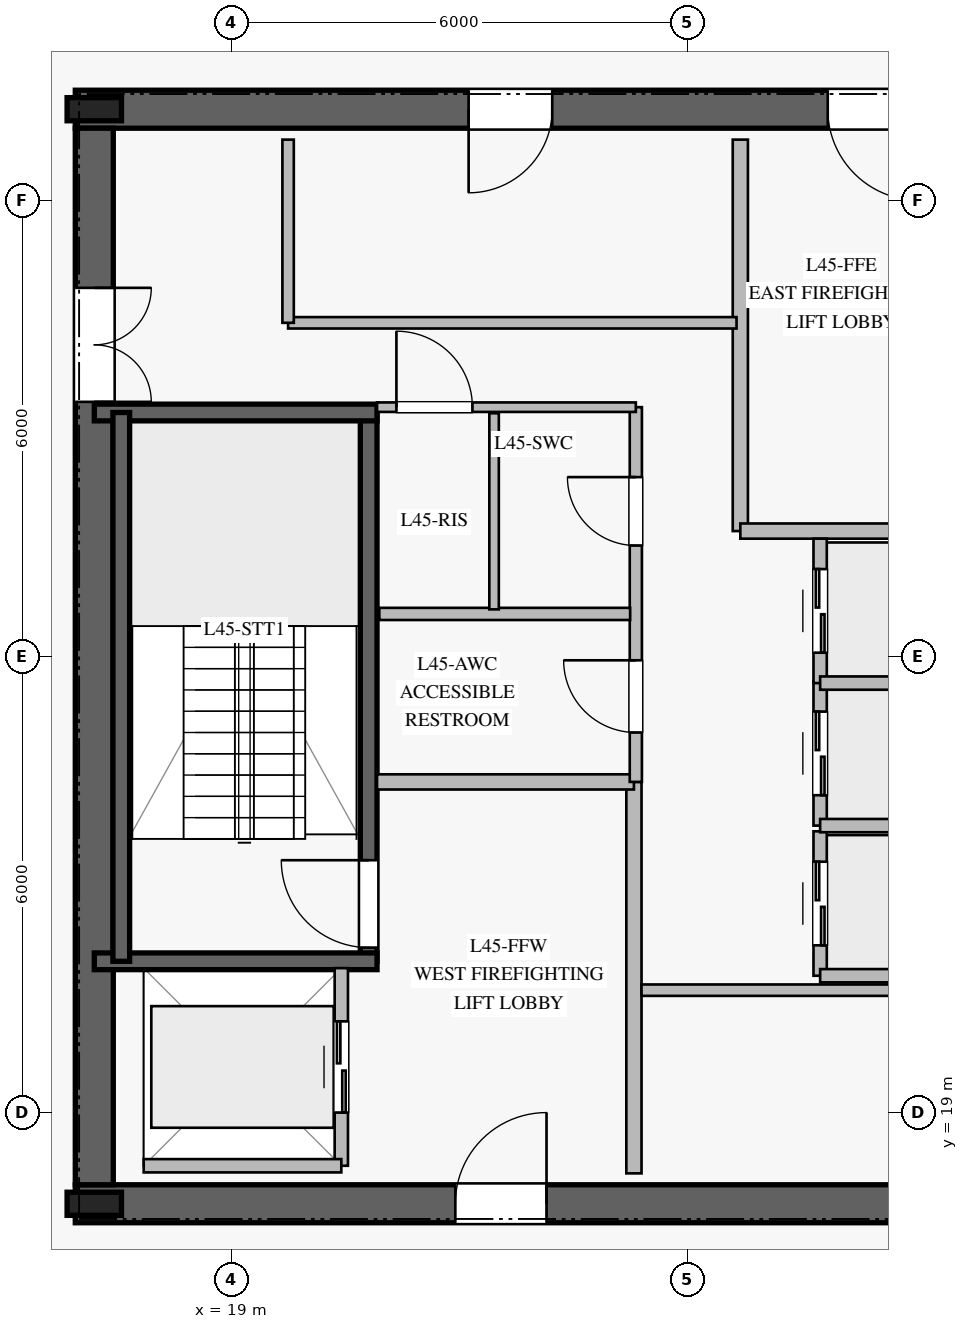
"""IFC4 building model, lengths in metres.
Left out: names, types, materials, properties, quantities, classifications, styles, units other than length and angle.
Written with IfcOpenShell. Run it as: python <this file> out.ifc"""

import sys

from ifc_helpers import new_model, si_unit, direction, frame, frame_2d, origin, origin_2d, place, context, subcontext, project, spatial, rectangle, i_section, extrude, element, fill, save


model = new_model("IFC4")
c1 = context("Model", 3, precision=1e-05, world=origin(), true_north=direction((0.0, 1.0)))
c2 = subcontext(c1, "Body", "Model", "MODEL_VIEW")
j1 = project(units=[si_unit("LENGTHUNIT", "METRE"), si_unit("PLANEANGLEUNIT", "RADIAN")], contexts=[c1])
p1 = place(None, origin())
s1 = spatial("IfcSite", under=j1, at=p1, CompositionType="ELEMENT")
p2 = place(p1, origin())
s2 = spatial("IfcBuilding", under=s1, at=p2, CompositionType="ELEMENT")
p3 = place(p2, frame((0.0, 0.0, 188.8)))
s3 = spatial("IfcBuildingStorey", under=s2, at=p3, CompositionType="ELEMENT", Elevation=188.8)
p4 = place(p3, frame((16.95, 17.8, 0.0), z_axis=(0.0, 0.0, 1.0), x_axis=(1.0, 0.0, 0.0)))
e1 = element("IfcWall", 1, at=p4, inside=s3, PredefinedType="SHEAR", context=c2, shape_type="SweptSolid", body=[
    extrude(rectangle(XDim=16.1, YDim=0.5, at=frame_2d((8.05, 0.0))), origin(), (0.0, 0.0, 1.0), 3.78),
])
p5 = place(p4, frame((5.0, 0.0, 0.0)))
e2 = element("IfcOpeningElement", 2, at=p5, cuts=e1, PredefinedType="OPENING", context=c2, shape_type="SweptSolid", body=[
    extrude(rectangle(XDim=1.2, YDim=2.25, at=frame_2d((0.6, 1.125))), frame((0.0, 0.26, 0.0), z_axis=(0.0, -1.0, 0.0), x_axis=(1.0, 0.0, 0.0)), (0.0, 0.0, 1.0), 0.52),
])
p6 = place(p4, frame((10.9, 0.0, 0.0)))
e3 = element("IfcOpeningElement", 3, at=p6, cuts=e1, PredefinedType="OPENING", context=c2, shape_type="SweptSolid", body=[
    extrude(rectangle(XDim=1.1, YDim=2.2, at=frame_2d((0.55, 1.1))), frame((0.0, 0.26, 0.0), z_axis=(0.0, -1.0, 0.0), x_axis=(1.0, 0.0, 0.0)), (0.0, 0.0, 1.0), 0.52),
])
p7 = place(p3, frame((33.05, 32.2, 0.0), z_axis=(0.0, 0.0, 1.0), x_axis=(-1.0, 0.0, 0.0)))
e4 = element("IfcWall", 4, at=p7, inside=s3, PredefinedType="SHEAR", context=c2, shape_type="SweptSolid", body=[
    extrude(rectangle(XDim=16.1, YDim=0.5, at=frame_2d((8.05, 0.0))), origin(), (0.0, 0.0, 1.0), 3.78),
])
p8 = place(p7, frame((5.0, 0.0, 0.0)))
e5 = element("IfcOpeningElement", 5, at=p8, cuts=e4, PredefinedType="OPENING", context=c2, shape_type="SweptSolid", body=[
    extrude(rectangle(XDim=1.2, YDim=2.25, at=frame_2d((0.6, 1.125))), frame((0.0, 0.26, 0.0), z_axis=(0.0, -1.0, 0.0), x_axis=(1.0, 0.0, 0.0)), (0.0, 0.0, 1.0), 0.52),
])
p9 = place(p7, frame((9.825, 0.0, 0.0)))
e6 = element("IfcOpeningElement", 6, at=p9, cuts=e4, PredefinedType="OPENING", context=c2, shape_type="SweptSolid", body=[
    extrude(rectangle(XDim=1.1, YDim=2.2, at=frame_2d((0.55, 1.1))), frame((0.0, 0.26, 0.0), z_axis=(0.0, -1.0, 0.0), x_axis=(1.0, 0.0, 0.0)), (0.0, 0.0, 1.0), 0.52),
])
p10 = place(p3, frame((17.2, 31.95, 0.0), z_axis=(0.0, 0.0, 1.0), x_axis=(0.0, -1.0, 0.0)))
e7 = element("IfcWall", 7, at=p10, inside=s3, PredefinedType="SHEAR", context=c2, shape_type="SweptSolid", body=[
    extrude(rectangle(XDim=13.9, YDim=0.5, at=frame_2d((6.95, 0.0))), origin(), (0.0, 0.0, 1.0), 3.78),
])
p11 = place(p10, frame((2.1, 0.0, 0.0)))
e8 = element("IfcOpeningElement", 8, at=p11, cuts=e7, PredefinedType="OPENING", context=c2, shape_type="SweptSolid", body=[
    extrude(rectangle(XDim=1.5, YDim=2.2, at=frame_2d((0.75, 1.1))), frame((0.0, 0.26, 0.0), z_axis=(0.0, -1.0, 0.0), x_axis=(1.0, 0.0, 0.0)), (0.0, 0.0, 1.0), 0.52),
])
for number, where, z_axis, x_axis in (
    (9, (17.2, 17.8, 0.0), (0.0, 0.0, 1.0), (1.0, 0.0, 0.0)),
    (10, (17.2, 32.2, 0.0), (0.0, 0.0, 1.0), (1.0, 0.0, 0.0)),
):
    element("IfcColumn", number, at=place(p3, frame(where, z_axis=z_axis, x_axis=x_axis)), inside=s3, PredefinedType="COLUMN", context=c2, shape_type="SweptSolid", body=[
        extrude(i_section(OverallWidth=0.304, OverallDepth=0.716, WebThickness=0.021, FlangeThickness=0.04, at=origin_2d()), origin(), (0.0, 0.0, 1.0), 4.0),
    ])
p12 = place(p3, frame((20.81, 20.99, 0.0), z_axis=(0.0, 0.0, 1.0), x_axis=(0.0, 1.0, 0.0)))
e11 = element("IfcWall", 11, at=p12, inside=s3, PredefinedType="SOLIDWALL", context=c2, shape_type="SweptSolid", body=[
    extrude(rectangle(XDim=7.22, YDim=0.22, at=frame_2d((3.61, 0.0))), origin(), (0.0, 0.0, 1.0), 3.78),
])
p13 = place(p12, frame((0.18, 0.0, 0.0)))
e12 = element("IfcOpeningElement", 12, at=p13, cuts=e11, PredefinedType="OPENING", context=c2, shape_type="SweptSolid", body=[
    extrude(rectangle(XDim=1.15, YDim=2.2, at=frame_2d((0.575, 1.1))), frame((0.0, 0.12, 0.0), z_axis=(0.0, -1.0, 0.0), x_axis=(1.0, 0.0, 0.0)), (0.0, 0.0, 1.0), 0.24),
])
for number, where, z_axis, x_axis in (
    (13, (17.2, 20.99, 0.0), (0.0, 0.0, 1.0), (1.0, 0.0, 0.0)),
    (14, (17.2, 28.21, 0.0), (0.0, 0.0, 1.0), (1.0, 0.0, 0.0)),
):
    element("IfcWall", number, at=place(p3, frame(where, z_axis=z_axis, x_axis=x_axis)), inside=s3, PredefinedType="SOLIDWALL", context=c2, shape_type="SweptSolid", body=[
        extrude(rectangle(XDim=3.72, YDim=0.22, at=frame_2d((1.86, 0.0))), origin(), (0.0, 0.0, 1.0), 3.78),
    ])
p14 = place(p3, frame((17.555, 28.21, 0.0), z_axis=(0.0, 0.0, 1.0), x_axis=(0.0, -1.0, 0.0)))
e15 = element("IfcWall", 15, at=p14, inside=s3, PredefinedType="SOLIDWALL", context=c2, shape_type="SweptSolid", body=[
    extrude(rectangle(XDim=7.22, YDim=0.22, at=frame_2d((3.61, 0.0))), origin(), (0.0, 0.0, 1.0), 3.78),
])
p15 = place(p3, frame((24.3, 18.2, 0.0), z_axis=(0.0, 0.0, 1.0), x_axis=(0.0, 1.0, 0.0)))
e16 = element("IfcWall", 16, at=p15, inside=s3, PredefinedType="PARTITIONING", context=c2, shape_type="SweptSolid", body=[
    extrude(rectangle(XDim=5.15, YDim=0.2, at=frame_2d((2.575, 0.0))), origin(), (0.0, 0.0, 1.0), 3.78),
])
p16 = place(p3, frame((20.92, 23.35, 0.0), z_axis=(0.0, 0.0, 1.0), x_axis=(1.0, 0.0, 0.0)))
e17 = element("IfcWall", 17, at=p16, inside=s3, PredefinedType="PARTITIONING", context=c2, shape_type="SweptSolid", body=[
    extrude(rectangle(XDim=3.38, YDim=0.2, at=frame_2d((1.69, 0.0))), origin(), (0.0, 0.0, 1.0), 3.78),
])
p17 = place(p3, frame((25.7, 26.65, 0.0), z_axis=(0.0, 0.0, 1.0), x_axis=(0.0, 1.0, 0.0)))
e18 = element("IfcWall", 18, at=p17, inside=s3, PredefinedType="PARTITIONING", context=c2, shape_type="SweptSolid", body=[
    extrude(rectangle(XDim=5.15, YDim=0.2, at=frame_2d((2.575, 0.0))), origin(), (0.0, 0.0, 1.0), 3.78),
])
p18 = place(p3, frame((25.7, 26.65, 0.0), z_axis=(0.0, 0.0, 1.0), x_axis=(1.0, 0.0, 0.0)))
e19 = element("IfcWall", 19, at=p18, inside=s3, PredefinedType="PARTITIONING", context=c2, shape_type="SweptSolid", body=[
    extrude(rectangle(XDim=3.38, YDim=0.2, at=frame_2d((1.69, 0.0))), origin(), (0.0, 0.0, 1.0), 3.78),
])
p19 = place(p3, frame((24.325, 23.35, 0.0), z_axis=(0.0, 0.0, 1.0), x_axis=(0.0, 1.0, 0.0)))
e20 = element("IfcWall", 20, at=p19, inside=s3, PredefinedType="PLUMBINGWALL", context=c2, shape_type="SweptSolid", body=[
    extrude(rectangle(XDim=4.93, YDim=0.16, at=frame_2d((2.465, 0.0))), origin(), (0.0, 0.0, 1.0), 3.78),
])
p20 = place(p19, frame((0.65, 0.0, 0.0)))
e21 = element("IfcOpeningElement", 21, at=p20, cuts=e20, PredefinedType="OPENING", context=c2, shape_type="SweptSolid", body=[
    extrude(rectangle(XDim=0.95, YDim=2.1, at=frame_2d((0.475, 1.05))), frame((0.0, 0.09, 0.0), z_axis=(0.0, -1.0, 0.0), x_axis=(1.0, 0.0, 0.0)), (0.0, 0.0, 1.0), 0.18),
])
p21 = place(p19, frame((3.11, 0.0, 0.0)))
e22 = element("IfcOpeningElement", 22, at=p21, cuts=e20, PredefinedType="OPENING", context=c2, shape_type="SweptSolid", body=[
    extrude(rectangle(XDim=0.9, YDim=2.1, at=frame_2d((0.45, 1.05))), frame((0.0, 0.09, 0.0), z_axis=(0.0, -1.0, 0.0), x_axis=(1.0, 0.0, 0.0)), (0.0, 0.0, 1.0), 0.18),
])
p22 = place(p3, frame((20.92, 28.28, 0.0), z_axis=(0.0, 0.0, 1.0), x_axis=(1.0, 0.0, 0.0)))
e23 = element("IfcWall", 23, at=p22, inside=s3, PredefinedType="PARTITIONING", context=c2, shape_type="SweptSolid", body=[
    extrude(rectangle(XDim=3.405, YDim=0.125, at=frame_2d((1.703, 0.0))), origin(), (0.0, 0.0, 1.0), 3.78),
])
p23 = place(p22, frame((0.255, 0.0, 0.0)))
e24 = element("IfcOpeningElement", 24, at=p23, cuts=e23, PredefinedType="OPENING", context=c2, shape_type="SweptSolid", body=[
    extrude(rectangle(XDim=1.0, YDim=2.15, at=frame_2d((0.5, 1.075))), frame((0.0, 0.073, 0.0), z_axis=(0.0, -1.0, 0.0), x_axis=(1.0, 0.0, 0.0)), (0.0, 0.0, 1.0), 0.145),
])
p24 = place(p3, frame((20.95, 25.56, 0.0), z_axis=(0.0, 0.0, 1.0), x_axis=(1.0, 0.0, 0.0)))
e25 = element("IfcWall", 25, at=p24, inside=s3, PredefinedType="PLUMBINGWALL", context=c2, shape_type="SweptSolid", body=[
    extrude(rectangle(XDim=3.3, YDim=0.16, at=frame_2d((1.65, 0.0))), origin(), (0.0, 0.0, 1.0), 3.78),
])
p25 = place(p3, frame((22.46, 25.62, 0.0), z_axis=(0.0, 0.0, 1.0), x_axis=(0.0, 1.0, 0.0)))
e26 = element("IfcWall", 26, at=p25, inside=s3, PredefinedType="PARTITIONING", context=c2, shape_type="SweptSolid", body=[
    extrude(rectangle(XDim=2.58, YDim=0.125, at=frame_2d((1.29, 0.0))), origin(), (0.0, 0.0, 1.0), 3.78),
])
p26 = place(p3, frame((24.4, 20.61, 0.0), z_axis=(0.0, 0.0, 1.0), x_axis=(1.0, 0.0, 0.0)))
e27 = element("IfcWall", 27, at=p26, inside=s3, PredefinedType="PARTITIONING", context=c2, shape_type="SweptSolid", body=[
    extrude(rectangle(XDim=5.9, YDim=0.15, at=frame_2d((2.95, 0.0))), origin(), (0.0, 0.0, 1.0), 3.78),
])
p27 = place(p3, frame((19.75, 29.39, 0.0), z_axis=(0.0, 0.0, 1.0), x_axis=(1.0, 0.0, 0.0)))
e28 = element("IfcWall", 28, at=p27, inside=s3, PredefinedType="PARTITIONING", context=c2, shape_type="SweptSolid", body=[
    extrude(rectangle(XDim=5.9, YDim=0.15, at=frame_2d((2.95, 0.0))), origin(), (0.0, 0.0, 1.0), 3.78),
])
p28 = place(p3, frame((19.75, 29.39, 0.0), z_axis=(0.0, 0.0, 1.0), x_axis=(0.0, 1.0, 0.0)))
e29 = element("IfcWall", 29, at=p28, inside=s3, PredefinedType="PARTITIONING", context=c2, shape_type="SweptSolid", body=[
    extrude(rectangle(XDim=2.41, YDim=0.15, at=frame_2d((1.205, 0.0))), origin(), (0.0, 0.0, 1.0), 3.78),
])
p29 = place(p3, frame((26.75, 20.8, 0.0), z_axis=(0.0, 0.0, 1.0), x_axis=(0.0, 1.0, 0.0)))
e30 = element("IfcWall", 30, at=p29, inside=s3, PredefinedType="PARTITIONING", context=c2, shape_type="SweptSolid", body=[
    extrude(rectangle(XDim=1.9, YDim=0.175, at=frame_2d((0.95, 0.0))), origin(), (0.0, 0.0, 1.0), 3.78),
])
p30 = place(p29, frame((0.4, 0.0, 0.0)))
e31 = element("IfcOpeningElement", 31, at=p30, cuts=e30, PredefinedType="OPENING", context=c2, shape_type="SweptSolid", body=[
    extrude(rectangle(XDim=1.1, YDim=2.2, at=frame_2d((0.55, 1.1))), frame((0.0, 0.098, 0.0), z_axis=(0.0, -1.0, 0.0), x_axis=(1.0, 0.0, 0.0)), (0.0, 0.0, 1.0), 0.195),
])
p31 = place(p3, frame((26.75, 20.8, 0.0), z_axis=(0.0, 0.0, 1.0), x_axis=(1.0, 0.0, 0.0)))
e32 = element("IfcWall", 32, at=p31, inside=s3, PredefinedType="PARTITIONING", context=c2, shape_type="SweptSolid", body=[
    extrude(rectangle(XDim=2.35, YDim=0.175, at=frame_2d((1.175, 0.0))), origin(), (0.0, 0.0, 1.0), 3.78),
])
p32 = place(p3, frame((26.75, 22.775, 0.0), z_axis=(0.0, 0.0, 1.0), x_axis=(0.0, 1.0, 0.0)))
e33 = element("IfcWall", 33, at=p32, inside=s3, PredefinedType="PARTITIONING", context=c2, shape_type="SweptSolid", body=[
    extrude(rectangle(XDim=1.9, YDim=0.175, at=frame_2d((0.95, 0.0))), origin(), (0.0, 0.0, 1.0), 3.78),
])
p33 = place(p32, frame((0.4, 0.0, 0.0)))
e34 = element("IfcOpeningElement", 34, at=p33, cuts=e33, PredefinedType="OPENING", context=c2, shape_type="SweptSolid", body=[
    extrude(rectangle(XDim=1.1, YDim=2.2, at=frame_2d((0.55, 1.1))), frame((0.0, 0.098, 0.0), z_axis=(0.0, -1.0, 0.0), x_axis=(1.0, 0.0, 0.0)), (0.0, 0.0, 1.0), 0.195),
])
p34 = place(p3, frame((26.75, 22.775, 0.0), z_axis=(0.0, 0.0, 1.0), x_axis=(1.0, 0.0, 0.0)))
e35 = element("IfcWall", 35, at=p34, inside=s3, PredefinedType="PARTITIONING", context=c2, shape_type="SweptSolid", body=[
    extrude(rectangle(XDim=2.35, YDim=0.175, at=frame_2d((1.175, 0.0))), origin(), (0.0, 0.0, 1.0), 3.78),
])
p35 = place(p3, frame((26.75, 24.65, 0.0), z_axis=(0.0, 0.0, 1.0), x_axis=(0.0, 1.0, 0.0)))
e36 = element("IfcWall", 36, at=p35, inside=s3, PredefinedType="PARTITIONING", context=c2, shape_type="SweptSolid", body=[
    extrude(rectangle(XDim=1.9, YDim=0.175, at=frame_2d((0.95, 0.0))), origin(), (0.0, 0.0, 1.0), 3.78),
])
p36 = place(p35, frame((0.4, 0.0, 0.0)))
e37 = element("IfcOpeningElement", 37, at=p36, cuts=e36, PredefinedType="OPENING", context=c2, shape_type="SweptSolid", body=[
    extrude(rectangle(XDim=1.1, YDim=2.2, at=frame_2d((0.55, 1.1))), frame((0.0, 0.098, 0.0), z_axis=(0.0, -1.0, 0.0), x_axis=(1.0, 0.0, 0.0)), (0.0, 0.0, 1.0), 0.195),
])
p37 = place(p3, frame((26.75, 24.65, 0.0), z_axis=(0.0, 0.0, 1.0), x_axis=(1.0, 0.0, 0.0)))
e38 = element("IfcWall", 38, at=p37, inside=s3, PredefinedType="PARTITIONING", context=c2, shape_type="SweptSolid", body=[
    extrude(rectangle(XDim=2.35, YDim=0.175, at=frame_2d((1.175, 0.0))), origin(), (0.0, 0.0, 1.0), 3.78),
])
p38 = place(p3, frame((20.45, 18.3, 0.0), z_axis=(0.0, 0.0, 1.0), x_axis=(0.0, 1.0, 0.0)))
e39 = element("IfcWall", 39, at=p38, inside=s3, PredefinedType="PARTITIONING", context=c2, shape_type="SweptSolid", body=[
    extrude(rectangle(XDim=2.6, YDim=0.175, at=frame_2d((1.3, 0.0))), origin(), (0.0, 0.0, 1.0), 3.78),
])
p39 = place(p38, frame((0.7, 0.0, 0.0)))
e40 = element("IfcOpeningElement", 40, at=p39, cuts=e39, PredefinedType="OPENING", context=c2, shape_type="SweptSolid", body=[
    extrude(rectangle(XDim=1.2, YDim=2.2, at=frame_2d((0.6, 1.1))), frame((0.0, 0.098, 0.0), z_axis=(0.0, -1.0, 0.0), x_axis=(1.0, 0.0, 0.0)), (0.0, 0.0, 1.0), 0.195),
])
p40 = place(p3, frame((17.85, 18.3, 0.0), z_axis=(0.0, 0.0, 1.0), x_axis=(1.0, 0.0, 0.0)))
e41 = element("IfcWall", 41, at=p40, inside=s3, PredefinedType="PARTITIONING", context=c2, shape_type="SweptSolid", body=[
    extrude(rectangle(XDim=2.6, YDim=0.175, at=frame_2d((1.3, 0.0))), origin(), (0.0, 0.0, 1.0), 3.78),
])
p41 = place(p13, origin())
e42 = element("IfcDoor", 42, at=p41, inside=s3, OperationType="SINGLE_SWING_RIGHT", PredefinedType="DOOR", context=c2, shape_type="SweptSolid", body=[
    extrude(rectangle(XDim=1.15, YDim=2.2, at=frame_2d((0.575, 1.1))), frame((0.0, 0.025, 0.0), z_axis=(0.0, -1.0, 0.0), x_axis=(1.0, 0.0, 0.0)), (0.0, 0.0, 1.0), 0.05),
])
fill(e12, e42)
p42 = place(p5, origin())
e43 = element("IfcDoor", 43, at=p42, inside=s3, OperationType="SINGLE_SWING_RIGHT", PredefinedType="DOOR", context=c2, shape_type="SweptSolid", body=[
    extrude(rectangle(XDim=1.2, YDim=2.25, at=frame_2d((0.6, 1.125))), frame((0.0, 0.025, 0.0), z_axis=(0.0, -1.0, 0.0), x_axis=(1.0, 0.0, 0.0)), (0.0, 0.0, 1.0), 0.05),
])
fill(e2, e43)
p43 = place(p8, origin())
e44 = element("IfcDoor", 44, at=p43, inside=s3, OperationType="SINGLE_SWING_LEFT", PredefinedType="DOOR", context=c2, shape_type="SweptSolid", body=[
    extrude(rectangle(XDim=1.2, YDim=2.25, at=frame_2d((0.6, 1.125))), frame((0.0, 0.025, 0.0), z_axis=(0.0, -1.0, 0.0), x_axis=(1.0, 0.0, 0.0)), (0.0, 0.0, 1.0), 0.05),
])
fill(e5, e44)
p44 = place(p11, origin())
e45 = element("IfcDoor", 45, at=p44, inside=s3, OperationType="DOUBLE_DOOR_SINGLE_SWING", PredefinedType="DOOR", context=c2, shape_type="SweptSolid", body=[
    extrude(rectangle(XDim=1.5, YDim=2.2, at=frame_2d((0.75, 1.1))), frame((0.0, 0.025, 0.0), z_axis=(0.0, -1.0, 0.0), x_axis=(1.0, 0.0, 0.0)), (0.0, 0.0, 1.0), 0.05),
])
fill(e8, e45)
p45 = place(p20, origin())
e46 = element("IfcDoor", 46, at=p45, inside=s3, OperationType="SINGLE_SWING_RIGHT", PredefinedType="DOOR", context=c2, shape_type="SweptSolid", body=[
    extrude(rectangle(XDim=0.95, YDim=2.1, at=frame_2d((0.475, 1.05))), frame((0.0, 0.025, 0.0), z_axis=(0.0, -1.0, 0.0), x_axis=(1.0, 0.0, 0.0)), (0.0, 0.0, 1.0), 0.05),
])
fill(e21, e46)
p46 = place(p23, origin())
e47 = element("IfcDoor", 47, at=p46, inside=s3, OperationType="SINGLE_SWING_LEFT", PredefinedType="DOOR", context=c2, shape_type="SweptSolid", body=[
    extrude(rectangle(XDim=1.0, YDim=2.15, at=frame_2d((0.5, 1.075))), frame((0.0, 0.025, 0.0), z_axis=(0.0, -1.0, 0.0), x_axis=(1.0, 0.0, 0.0)), (0.0, 0.0, 1.0), 0.05),
])
fill(e24, e47)
p47 = place(p21, origin())
e48 = element("IfcDoor", 48, at=p47, inside=s3, OperationType="SINGLE_SWING_RIGHT", PredefinedType="DOOR", context=c2, shape_type="SweptSolid", body=[
    extrude(rectangle(XDim=0.9, YDim=2.1, at=frame_2d((0.45, 1.05))), frame((0.0, 0.025, 0.0), z_axis=(0.0, -1.0, 0.0), x_axis=(1.0, 0.0, 0.0)), (0.0, 0.0, 1.0), 0.05),
])
fill(e22, e48)
p48 = place(p9, origin())
e49 = element("IfcDoor", 49, at=p48, inside=s3, OperationType="SINGLE_SWING_RIGHT", PredefinedType="DOOR", context=c2, shape_type="SweptSolid", body=[
    extrude(rectangle(XDim=1.1, YDim=2.2, at=frame_2d((0.55, 1.1))), frame((0.0, 0.025, 0.0), z_axis=(0.0, -1.0, 0.0), x_axis=(1.0, 0.0, 0.0)), (0.0, 0.0, 1.0), 0.05),
])
fill(e6, e49)
p49 = place(p30, origin())
e50 = element("IfcDoor", 50, at=p49, inside=s3, OperationType="DOUBLE_DOOR_SLIDING", PredefinedType="DOOR", context=c2, shape_type="SweptSolid", body=[
    extrude(rectangle(XDim=1.1, YDim=2.2, at=frame_2d((0.55, 1.1))), frame((0.0, 0.025, 0.0), z_axis=(0.0, -1.0, 0.0), x_axis=(1.0, 0.0, 0.0)), (0.0, 0.0, 1.0), 0.05),
])
fill(e31, e50)
p50 = place(p33, origin())
e51 = element("IfcDoor", 51, at=p50, inside=s3, OperationType="DOUBLE_DOOR_SLIDING", PredefinedType="DOOR", context=c2, shape_type="SweptSolid", body=[
    extrude(rectangle(XDim=1.1, YDim=2.2, at=frame_2d((0.55, 1.1))), frame((0.0, 0.025, 0.0), z_axis=(0.0, -1.0, 0.0), x_axis=(1.0, 0.0, 0.0)), (0.0, 0.0, 1.0), 0.05),
])
fill(e34, e51)
p51 = place(p36, origin())
e52 = element("IfcDoor", 52, at=p51, inside=s3, OperationType="DOUBLE_DOOR_SLIDING", PredefinedType="DOOR", context=c2, shape_type="SweptSolid", body=[
    extrude(rectangle(XDim=1.1, YDim=2.2, at=frame_2d((0.55, 1.1))), frame((0.0, 0.025, 0.0), z_axis=(0.0, -1.0, 0.0), x_axis=(1.0, 0.0, 0.0)), (0.0, 0.0, 1.0), 0.05),
])
fill(e37, e52)
p52 = place(p39, origin())
e53 = element("IfcDoor", 53, at=p52, inside=s3, OperationType="DOUBLE_DOOR_SLIDING", PredefinedType="DOOR", context=c2, shape_type="SweptSolid", body=[
    extrude(rectangle(XDim=1.2, YDim=2.2, at=frame_2d((0.6, 1.1))), frame((0.0, 0.025, 0.0), z_axis=(0.0, -1.0, 0.0), x_axis=(1.0, 0.0, 0.0)), (0.0, 0.0, 1.0), 0.05),
])
fill(e40, e53)
save(model, sys.argv[1])
